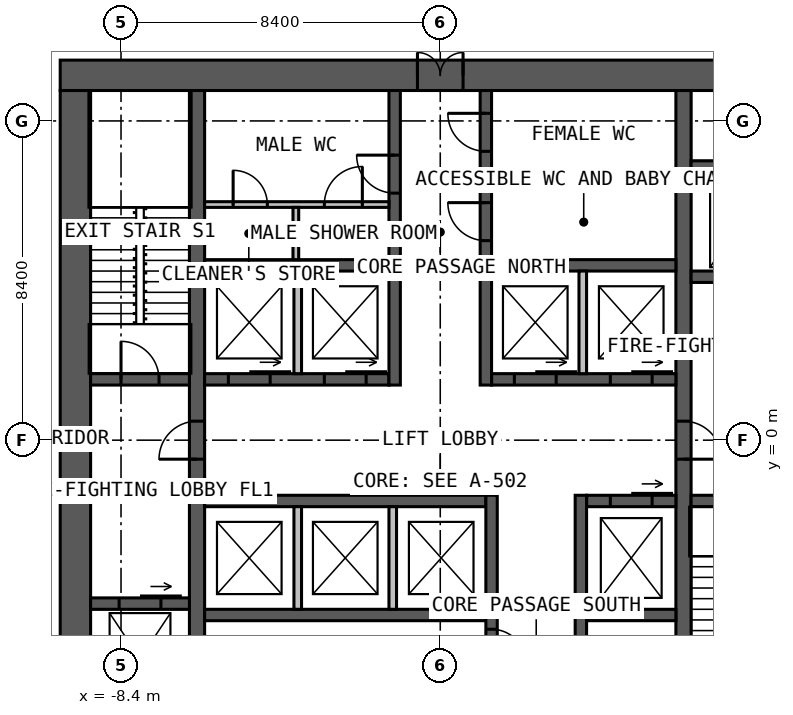
"""IFC4 building model, lengths in metres.
Left out: names, types, materials, properties, quantities, classifications, styles, units other than length and angle.
Written with IfcOpenShell. Run it as: python <this file> out.ifc"""

import sys

from ifc_helpers import new_model, si_unit, direction, frame, frame_2d, origin, place, context, subcontext, project, spatial, rectangle, extrude, element, fill, save


model = new_model("IFC4")
c1 = context("Model", 3, precision=1e-05, world=origin(), true_north=direction((0.0, 1.0)))
c2 = subcontext(c1, "Body", "Model", "MODEL_VIEW")
j1 = project(units=[si_unit("LENGTHUNIT", "METRE"), si_unit("PLANEANGLEUNIT", "RADIAN")], contexts=[c1])
p1 = place(None, origin())
s1 = spatial("IfcSite", under=j1, at=p1, CompositionType="ELEMENT")
p2 = place(p1, origin())
s2 = spatial("IfcBuilding", under=s1, at=p2, CompositionType="ELEMENT")
p3 = place(p2, frame((0.0, 0.0, 41.0)))
s3 = spatial("IfcBuildingStorey", under=s2, at=p3, CompositionType="ELEMENT", Elevation=41.0)
p4 = place(p3, frame((-10.0, 9.6, 0.0), z_axis=(0.0, 0.0, 1.0), x_axis=(1.0, 0.0, 0.0)))
e1 = element("IfcWall", 1, at=p4, inside=s3, PredefinedType="SOLIDWALL", context=c2, shape_type="SweptSolid", body=[
    extrude(rectangle(XDim=20.0, YDim=0.8, at=frame_2d((10.0, 0.0))), origin(), (0.0, 0.0, 1.0), 4.0),
])
p5 = place(p4, frame((9.4, 0.0, 0.0)))
e2 = element("IfcOpeningElement", 2, at=p5, cuts=e1, PredefinedType="OPENING", context=c2, shape_type="SweptSolid", body=[
    extrude(rectangle(XDim=1.2, YDim=2.2, at=frame_2d((0.6, 1.1))), frame((0.0, 0.41, 0.0), z_axis=(0.0, -1.0, 0.0), x_axis=(1.0, 0.0, 0.0)), (0.0, 0.0, 1.0), 0.82),
])
p6 = place(p3, frame((-9.6, 9.2, 0.0), z_axis=(0.0, 0.0, 1.0), x_axis=(0.0, -1.0, 0.0)))
e3 = element("IfcWall", 3, at=p6, inside=s3, PredefinedType="SOLIDWALL", context=c2, shape_type="SweptSolid", body=[
    extrude(rectangle(XDim=18.4, YDim=0.8, at=frame_2d((9.2, 0.0))), origin(), (0.0, 0.0, 1.0), 4.0),
])
p7 = place(p3, frame((-6.4, -9.2, 0.0), z_axis=(0.0, 0.0, 1.0), x_axis=(0.0, 1.0, 0.0)))
e4 = element("IfcWall", 4, at=p7, inside=s3, PredefinedType="SOLIDWALL", context=c2, shape_type="SweptSolid", body=[
    extrude(rectangle(XDim=18.4, YDim=0.4, at=frame_2d((9.2, 0.0))), origin(), (0.0, 0.0, 1.0), 4.0),
])
p8 = place(p7, frame((8.7, 0.0, 0.0)))
e5 = element("IfcOpeningElement", 5, at=p8, cuts=e4, PredefinedType="OPENING", context=c2, shape_type="SweptSolid", body=[
    extrude(rectangle(XDim=1.0, YDim=2.2, at=frame_2d((0.5, 1.1))), frame((0.0, 0.21, 0.0), z_axis=(0.0, -1.0, 0.0), x_axis=(1.0, 0.0, 0.0)), (0.0, 0.0, 1.0), 0.42),
])
p9 = place(p3, frame((6.4, 9.2, 0.0), z_axis=(0.0, 0.0, 1.0), x_axis=(0.0, -1.0, 0.0)))
e6 = element("IfcWall", 6, at=p9, inside=s3, PredefinedType="SOLIDWALL", context=c2, shape_type="SweptSolid", body=[
    extrude(rectangle(XDim=18.4, YDim=0.4, at=frame_2d((9.2, 0.0))), origin(), (0.0, 0.0, 1.0), 4.0),
])
p10 = place(p9, frame((8.7, 0.0, 0.0)))
e7 = element("IfcOpeningElement", 7, at=p10, cuts=e6, PredefinedType="OPENING", context=c2, shape_type="SweptSolid", body=[
    extrude(rectangle(XDim=1.0, YDim=2.2, at=frame_2d((0.5, 1.1))), frame((0.0, 0.21, 0.0), z_axis=(0.0, -1.0, 0.0), x_axis=(1.0, 0.0, 0.0)), (0.0, 0.0, 1.0), 0.42),
])
p11 = place(p3, frame((-6.2, 1.6, 0.0), z_axis=(0.0, 0.0, 1.0), x_axis=(1.0, 0.0, 0.0)))
e8 = element("IfcWall", 8, at=p11, inside=s3, PredefinedType="SOLIDWALL", context=c2, shape_type="SweptSolid", body=[
    extrude(rectangle(XDim=4.85, YDim=0.3, at=frame_2d((2.425, 0.0))), origin(), (0.0, 0.0, 1.0), 4.0),
])
p12 = place(p11, frame((0.625, 0.0, 0.0)))
e9 = element("IfcOpeningElement", 9, at=p12, cuts=e8, PredefinedType="OPENING", context=c2, shape_type="SweptSolid", body=[
    extrude(rectangle(XDim=1.1, YDim=2.2, at=frame_2d((0.55, 1.1))), frame((0.0, 0.16, 0.0), z_axis=(0.0, -1.0, 0.0), x_axis=(1.0, 0.0, 0.0)), (0.0, 0.0, 1.0), 0.32),
])
p13 = place(p11, frame((3.15, 0.0, 0.0)))
e10 = element("IfcOpeningElement", 10, at=p13, cuts=e8, PredefinedType="OPENING", context=c2, shape_type="SweptSolid", body=[
    extrude(rectangle(XDim=1.1, YDim=2.2, at=frame_2d((0.55, 1.1))), frame((0.0, 0.16, 0.0), z_axis=(0.0, -1.0, 0.0), x_axis=(1.0, 0.0, 0.0)), (0.0, 0.0, 1.0), 0.32),
])
p14 = place(p3, frame((1.35, 1.6, 0.0), z_axis=(0.0, 0.0, 1.0), x_axis=(1.0, 0.0, 0.0)))
e11 = element("IfcWall", 11, at=p14, inside=s3, PredefinedType="SOLIDWALL", context=c2, shape_type="SweptSolid", body=[
    extrude(rectangle(XDim=4.85, YDim=0.3, at=frame_2d((2.425, 0.0))), origin(), (0.0, 0.0, 1.0), 4.0),
])
p15 = place(p14, frame((0.6, 0.0, 0.0)))
e12 = element("IfcOpeningElement", 12, at=p15, cuts=e11, PredefinedType="OPENING", context=c2, shape_type="SweptSolid", body=[
    extrude(rectangle(XDim=1.1, YDim=2.2, at=frame_2d((0.55, 1.1))), frame((0.0, 0.16, 0.0), z_axis=(0.0, -1.0, 0.0), x_axis=(1.0, 0.0, 0.0)), (0.0, 0.0, 1.0), 0.32),
])
p16 = place(p14, frame((3.125, 0.0, 0.0)))
e13 = element("IfcOpeningElement", 13, at=p16, cuts=e11, PredefinedType="OPENING", context=c2, shape_type="SweptSolid", body=[
    extrude(rectangle(XDim=1.1, YDim=2.2, at=frame_2d((0.55, 1.1))), frame((0.0, 0.16, 0.0), z_axis=(0.0, -1.0, 0.0), x_axis=(1.0, 0.0, 0.0)), (0.0, 0.0, 1.0), 0.32),
])
for number, where, z_axis, x_axis in (
    (14, (-6.2, 4.6, 0.0), (0.0, 0.0, 1.0), (1.0, 0.0, 0.0)),
    (15, (1.35, 4.6, 0.0), (0.0, 0.0, 1.0), (1.0, 0.0, 0.0)),
):
    element("IfcWall", number, at=place(p3, frame(where, z_axis=z_axis, x_axis=x_axis)), inside=s3, PredefinedType="SOLIDWALL", context=c2, shape_type="SweptSolid", body=[
        extrude(rectangle(XDim=4.85, YDim=0.3, at=frame_2d((2.425, 0.0))), origin(), (0.0, 0.0, 1.0), 4.0),
    ])
p17 = place(p3, frame((-1.2, 1.45, 0.0), z_axis=(0.0, 0.0, 1.0), x_axis=(0.0, 1.0, 0.0)))
e16 = element("IfcWall", 16, at=p17, inside=s3, PredefinedType="SOLIDWALL", context=c2, shape_type="SweptSolid", body=[
    extrude(rectangle(XDim=7.75, YDim=0.3, at=frame_2d((3.875, 0.0))), origin(), (0.0, 0.0, 1.0), 4.0),
])
p18 = place(p17, frame((5.05, 0.0, 0.0)))
e17 = element("IfcOpeningElement", 17, at=p18, cuts=e16, PredefinedType="OPENING", context=c2, shape_type="SweptSolid", body=[
    extrude(rectangle(XDim=1.0, YDim=2.2, at=frame_2d((0.5, 1.1))), frame((0.0, 0.16, 0.0), z_axis=(0.0, -1.0, 0.0), x_axis=(1.0, 0.0, 0.0)), (0.0, 0.0, 1.0), 0.32),
])
p19 = place(p3, frame((1.2, 1.45, 0.0), z_axis=(0.0, 0.0, 1.0), x_axis=(0.0, 1.0, 0.0)))
e18 = element("IfcWall", 18, at=p19, inside=s3, PredefinedType="SOLIDWALL", context=c2, shape_type="SweptSolid", body=[
    extrude(rectangle(XDim=7.75, YDim=0.3, at=frame_2d((3.875, 0.0))), origin(), (0.0, 0.0, 1.0), 4.0),
])
p20 = place(p19, frame((3.8, 0.0, 0.0)))
e19 = element("IfcOpeningElement", 19, at=p20, cuts=e18, PredefinedType="OPENING", context=c2, shape_type="SweptSolid", body=[
    extrude(rectangle(XDim=1.0, YDim=2.2, at=frame_2d((0.5, 1.1))), frame((0.0, 0.16, 0.0), z_axis=(0.0, -1.0, 0.0), x_axis=(1.0, 0.0, 0.0)), (0.0, 0.0, 1.0), 0.32),
])
p21 = place(p19, frame((6.15, 0.0, 0.0)))
e20 = element("IfcOpeningElement", 20, at=p21, cuts=e18, PredefinedType="OPENING", context=c2, shape_type="SweptSolid", body=[
    extrude(rectangle(XDim=1.0, YDim=2.2, at=frame_2d((0.5, 1.1))), frame((0.0, 0.16, 0.0), z_axis=(0.0, -1.0, 0.0), x_axis=(1.0, 0.0, 0.0)), (0.0, 0.0, 1.0), 0.32),
])
p22 = place(p3, frame((-6.2, -1.6, 0.0), z_axis=(0.0, 0.0, 1.0), x_axis=(1.0, 0.0, 0.0)))
e21 = element("IfcWall", 21, at=p22, inside=s3, PredefinedType="SOLIDWALL", context=c2, shape_type="SweptSolid", body=[
    extrude(rectangle(XDim=7.4, YDim=0.3, at=frame_2d((3.7, 0.0))), origin(), (0.0, 0.0, 1.0), 4.0),
])
p23 = place(p3, frame((3.85, -1.6, 0.0), z_axis=(0.0, 0.0, 1.0), x_axis=(1.0, 0.0, 0.0)))
e22 = element("IfcWall", 22, at=p23, inside=s3, PredefinedType="SOLIDWALL", context=c2, shape_type="SweptSolid", body=[
    extrude(rectangle(XDim=2.35, YDim=0.3, at=frame_2d((1.175, 0.0))), origin(), (0.0, 0.0, 1.0), 4.0),
])
p24 = place(p23, frame((0.625, 0.0, 0.0)))
e23 = element("IfcOpeningElement", 23, at=p24, cuts=e22, PredefinedType="OPENING", context=c2, shape_type="SweptSolid", body=[
    extrude(rectangle(XDim=1.1, YDim=2.2, at=frame_2d((0.55, 1.1))), frame((0.0, 0.16, 0.0), z_axis=(0.0, -1.0, 0.0), x_axis=(1.0, 0.0, 0.0)), (0.0, 0.0, 1.0), 0.32),
])
p25 = place(p3, frame((-6.2, -4.6, 0.0), z_axis=(0.0, 0.0, 1.0), x_axis=(1.0, 0.0, 0.0)))
e24 = element("IfcWall", 24, at=p25, inside=s3, PredefinedType="SOLIDWALL", context=c2, shape_type="SweptSolid", body=[
    extrude(rectangle(XDim=7.4, YDim=0.3, at=frame_2d((3.7, 0.0))), origin(), (0.0, 0.0, 1.0), 4.0),
])
p26 = place(p3, frame((3.85, -4.6, 0.0), z_axis=(0.0, 0.0, 1.0), x_axis=(1.0, 0.0, 0.0)))
e25 = element("IfcWall", 25, at=p26, inside=s3, PredefinedType="SOLIDWALL", context=c2, shape_type="SweptSolid", body=[
    extrude(rectangle(XDim=2.35, YDim=0.3, at=frame_2d((1.175, 0.0))), origin(), (0.0, 0.0, 1.0), 4.0),
])
p27 = place(p3, frame((1.35, -1.45, 0.0), z_axis=(0.0, 0.0, 1.0), x_axis=(0.0, -1.0, 0.0)))
e26 = element("IfcWall", 26, at=p27, inside=s3, PredefinedType="SOLIDWALL", context=c2, shape_type="SweptSolid", body=[
    extrude(rectangle(XDim=7.75, YDim=0.3, at=frame_2d((3.875, 0.0))), origin(), (0.0, 0.0, 1.0), 4.0),
])
p28 = place(p27, frame((5.8, 0.0, 0.0)))
e27 = element("IfcOpeningElement", 27, at=p28, cuts=e26, PredefinedType="OPENING", context=c2, shape_type="SweptSolid", body=[
    extrude(rectangle(XDim=1.0, YDim=2.2, at=frame_2d((0.5, 1.1))), frame((0.0, 0.16, 0.0), z_axis=(0.0, -1.0, 0.0), x_axis=(1.0, 0.0, 0.0)), (0.0, 0.0, 1.0), 0.32),
])
p29 = place(p27, frame((3.525, 0.0, 0.0)))
e28 = element("IfcOpeningElement", 28, at=p29, cuts=e26, PredefinedType="OPENING", context=c2, shape_type="SweptSolid", body=[
    extrude(rectangle(XDim=0.9, YDim=2.2, at=frame_2d((0.45, 1.1))), frame((0.0, 0.16, 0.0), z_axis=(0.0, -1.0, 0.0), x_axis=(1.0, 0.0, 0.0)), (0.0, 0.0, 1.0), 0.32),
])
p30 = place(p3, frame((3.7, -1.45, 0.0), z_axis=(0.0, 0.0, 1.0), x_axis=(0.0, -1.0, 0.0)))
e29 = element("IfcWall", 29, at=p30, inside=s3, PredefinedType="SOLIDWALL", context=c2, shape_type="SweptSolid", body=[
    extrude(rectangle(XDim=7.75, YDim=0.3, at=frame_2d((3.875, 0.0))), origin(), (0.0, 0.0, 1.0), 4.0),
])
p31 = place(p30, frame((5.1, 0.0, 0.0)))
e30 = element("IfcOpeningElement", 30, at=p31, cuts=e29, PredefinedType="OPENING", context=c2, shape_type="SweptSolid", body=[
    extrude(rectangle(XDim=0.9, YDim=2.2, at=frame_2d((0.45, 1.1))), frame((0.0, 0.16, 0.0), z_axis=(0.0, -1.0, 0.0), x_axis=(1.0, 0.0, 0.0)), (0.0, 0.0, 1.0), 0.32),
])
p32 = place(p3, frame((-9.2, 1.6, 0.0), z_axis=(0.0, 0.0, 1.0), x_axis=(1.0, 0.0, 0.0)))
e31 = element("IfcWall", 31, at=p32, inside=s3, PredefinedType="SOLIDWALL", context=c2, shape_type="SweptSolid", body=[
    extrude(rectangle(XDim=2.6, YDim=0.3, at=frame_2d((1.3, 0.0))), origin(), (0.0, 0.0, 1.0), 4.0),
])
p33 = place(p32, frame((0.8, 0.0, 0.0)))
e32 = element("IfcOpeningElement", 32, at=p33, cuts=e31, PredefinedType="OPENING", context=c2, shape_type="SweptSolid", body=[
    extrude(rectangle(XDim=1.0, YDim=2.2, at=frame_2d((0.5, 1.1))), frame((0.0, 0.16, 0.0), z_axis=(0.0, -1.0, 0.0), x_axis=(1.0, 0.0, 0.0)), (0.0, 0.0, 1.0), 0.32),
])
p34 = place(p3, frame((6.6, -1.6, 0.0), z_axis=(0.0, 0.0, 1.0), x_axis=(1.0, 0.0, 0.0)))
e33 = element("IfcWall", 33, at=p34, inside=s3, PredefinedType="SOLIDWALL", context=c2, shape_type="SweptSolid", body=[
    extrude(rectangle(XDim=2.6, YDim=0.3, at=frame_2d((1.3, 0.0))), origin(), (0.0, 0.0, 1.0), 4.0),
])
p35 = place(p34, frame((0.8, 0.0, 0.0)))
e34 = element("IfcOpeningElement", 34, at=p35, cuts=e33, PredefinedType="OPENING", context=c2, shape_type="SweptSolid", body=[
    extrude(rectangle(XDim=1.0, YDim=2.2, at=frame_2d((0.5, 1.1))), frame((0.0, 0.16, 0.0), z_axis=(0.0, -1.0, 0.0), x_axis=(1.0, 0.0, 0.0)), (0.0, 0.0, 1.0), 0.32),
])
p36 = place(p3, frame((-9.2, -4.3, 0.0), z_axis=(0.0, 0.0, 1.0), x_axis=(1.0, 0.0, 0.0)))
e35 = element("IfcWall", 35, at=p36, inside=s3, PredefinedType="SOLIDWALL", context=c2, shape_type="SweptSolid", body=[
    extrude(rectangle(XDim=2.6, YDim=0.3, at=frame_2d((1.3, 0.0))), origin(), (0.0, 0.0, 1.0), 4.0),
])
p37 = place(p36, frame((0.75, 0.0, 0.0)))
e36 = element("IfcOpeningElement", 36, at=p37, cuts=e35, PredefinedType="OPENING", context=c2, shape_type="SweptSolid", body=[
    extrude(rectangle(XDim=1.1, YDim=2.2, at=frame_2d((0.55, 1.1))), frame((0.0, 0.16, 0.0), z_axis=(0.0, -1.0, 0.0), x_axis=(1.0, 0.0, 0.0)), (0.0, 0.0, 1.0), 0.32),
])
p38 = place(p3, frame((6.6, 4.3, 0.0), z_axis=(0.0, 0.0, 1.0), x_axis=(1.0, 0.0, 0.0)))
e37 = element("IfcWall", 37, at=p38, inside=s3, PredefinedType="SOLIDWALL", context=c2, shape_type="SweptSolid", body=[
    extrude(rectangle(XDim=2.6, YDim=0.3, at=frame_2d((1.3, 0.0))), origin(), (0.0, 0.0, 1.0), 4.0),
])
p39 = place(p38, frame((0.75, 0.0, 0.0)))
e38 = element("IfcOpeningElement", 38, at=p39, cuts=e37, PredefinedType="OPENING", context=c2, shape_type="SweptSolid", body=[
    extrude(rectangle(XDim=1.1, YDim=2.2, at=frame_2d((0.55, 1.1))), frame((0.0, 0.16, 0.0), z_axis=(0.0, -1.0, 0.0), x_axis=(1.0, 0.0, 0.0)), (0.0, 0.0, 1.0), 0.32),
])
p40 = place(p3, frame((6.6, 7.2, 0.0), z_axis=(0.0, 0.0, 1.0), x_axis=(1.0, 0.0, 0.0)))
e39 = element("IfcWall", 39, at=p40, inside=s3, PredefinedType="SOLIDWALL", context=c2, shape_type="SweptSolid", body=[
    extrude(rectangle(XDim=2.6, YDim=0.3, at=frame_2d((1.3, 0.0))), origin(), (0.0, 0.0, 1.0), 4.0),
])
for number, where, z_axis, x_axis in (
    (40, (-3.75, 1.75, 0.0), (0.0, 0.0, 1.0), (0.0, 1.0, 0.0)),
    (41, (3.75, 1.75, 0.0), (0.0, 0.0, 1.0), (0.0, 1.0, 0.0)),
    (42, (-3.75, -1.75, 0.0), (0.0, 0.0, 1.0), (0.0, -1.0, 0.0)),
    (43, (-1.25, -1.75, 0.0), (0.0, 0.0, 1.0), (0.0, -1.0, 0.0)),
):
    element("IfcWall", number, at=place(p3, frame(where, z_axis=z_axis, x_axis=x_axis)), inside=s3, PredefinedType="SOLIDWALL", context=c2, shape_type="SweptSolid", body=[
        extrude(rectangle(XDim=2.7, YDim=0.2, at=frame_2d((1.35, 0.0))), origin(), (0.0, 0.0, 1.0), 3.75),
    ])
p41 = place(p3, frame((1.35, 6.8, 0.0), z_axis=(0.0, 0.0, 1.0), x_axis=(1.0, 0.0, 0.0)))
e44 = element("IfcWall", 44, at=p41, inside=s3, PredefinedType="PARTITIONING", context=c2, shape_type="SweptSolid", body=[
    extrude(rectangle(XDim=4.85, YDim=0.15, at=frame_2d((2.425, 0.0))), origin(), (0.0, 0.0, 1.0), 3.75),
])
p42 = place(p3, frame((-6.2, 6.2, 0.0), z_axis=(0.0, 0.0, 1.0), x_axis=(1.0, 0.0, 0.0)))
e45 = element("IfcWall", 45, at=p42, inside=s3, PredefinedType="PARTITIONING", context=c2, shape_type="SweptSolid", body=[
    extrude(rectangle(XDim=4.85, YDim=0.15, at=frame_2d((2.425, 0.0))), origin(), (0.0, 0.0, 1.0), 3.75),
])
p43 = place(p42, frame((3.15, 0.0, 0.0)))
e46 = element("IfcOpeningElement", 46, at=p43, cuts=e45, PredefinedType="OPENING", context=c2, shape_type="SweptSolid", body=[
    extrude(rectangle(XDim=1.0, YDim=2.2, at=frame_2d((0.5, 1.1))), frame((0.0, 0.085, 0.0), z_axis=(0.0, -1.0, 0.0), x_axis=(1.0, 0.0, 0.0)), (0.0, 0.0, 1.0), 0.17),
])
p44 = place(p42, frame((0.75, 0.0, 0.0)))
e47 = element("IfcOpeningElement", 47, at=p44, cuts=e45, PredefinedType="OPENING", context=c2, shape_type="SweptSolid", body=[
    extrude(rectangle(XDim=0.9, YDim=2.2, at=frame_2d((0.45, 1.1))), frame((0.0, 0.085, 0.0), z_axis=(0.0, -1.0, 0.0), x_axis=(1.0, 0.0, 0.0)), (0.0, 0.0, 1.0), 0.17),
])
p45 = place(p3, frame((-3.8, 4.75, 0.0), z_axis=(0.0, 0.0, 1.0), x_axis=(0.0, 1.0, 0.0)))
e48 = element("IfcWall", 48, at=p45, inside=s3, PredefinedType="PARTITIONING", context=c2, shape_type="SweptSolid", body=[
    extrude(rectangle(XDim=1.375, YDim=0.15, at=frame_2d((0.688, 0.0))), origin(), (0.0, 0.0, 1.0), 3.75),
])
p46 = place(p5, origin())
e49 = element("IfcDoor", 49, at=p46, inside=s3, OperationType="DOUBLE_DOOR_SINGLE_SWING", PredefinedType="DOOR", context=c2, shape_type="SweptSolid", body=[
    extrude(rectangle(XDim=1.2, YDim=2.2, at=frame_2d((0.6, 1.1))), frame((0.0, 0.025, 0.0), z_axis=(0.0, -1.0, 0.0), x_axis=(1.0, 0.0, 0.0)), (0.0, 0.0, 1.0), 0.05),
])
fill(e2, e49)
p47 = place(p8, origin())
e50 = element("IfcDoor", 50, at=p47, inside=s3, OperationType="SINGLE_SWING_LEFT", PredefinedType="DOOR", context=c2, shape_type="SweptSolid", body=[
    extrude(rectangle(XDim=1.0, YDim=2.2, at=frame_2d((0.5, 1.1))), frame((0.0, 0.025, 0.0), z_axis=(0.0, -1.0, 0.0), x_axis=(1.0, 0.0, 0.0)), (0.0, 0.0, 1.0), 0.05),
])
fill(e5, e50)
p48 = place(p10, origin())
e51 = element("IfcDoor", 51, at=p48, inside=s3, OperationType="SINGLE_SWING_RIGHT", PredefinedType="DOOR", context=c2, shape_type="SweptSolid", body=[
    extrude(rectangle(XDim=1.0, YDim=2.2, at=frame_2d((0.5, 1.1))), frame((0.0, 0.025, 0.0), z_axis=(0.0, -1.0, 0.0), x_axis=(1.0, 0.0, 0.0)), (0.0, 0.0, 1.0), 0.05),
])
fill(e7, e51)
p49 = place(p33, origin())
e52 = element("IfcDoor", 52, at=p49, inside=s3, OperationType="SINGLE_SWING_LEFT", PredefinedType="DOOR", context=c2, shape_type="SweptSolid", body=[
    extrude(rectangle(XDim=1.0, YDim=2.2, at=frame_2d((0.5, 1.1))), frame((0.0, 0.025, 0.0), z_axis=(0.0, -1.0, 0.0), x_axis=(1.0, 0.0, 0.0)), (0.0, 0.0, 1.0), 0.05),
])
fill(e32, e52)
p50 = place(p18, origin())
e53 = element("IfcDoor", 53, at=p50, inside=s3, OperationType="SINGLE_SWING_RIGHT", PredefinedType="DOOR", context=c2, shape_type="SweptSolid", body=[
    extrude(rectangle(XDim=1.0, YDim=2.2, at=frame_2d((0.5, 1.1))), frame((0.0, 0.025, 0.0), z_axis=(0.0, -1.0, 0.0), x_axis=(1.0, 0.0, 0.0)), (0.0, 0.0, 1.0), 0.05),
])
fill(e17, e53)
p51 = place(p20, origin())
e54 = element("IfcDoor", 54, at=p51, inside=s3, OperationType="SINGLE_SWING_RIGHT", PredefinedType="DOOR", context=c2, shape_type="SweptSolid", body=[
    extrude(rectangle(XDim=1.0, YDim=2.2, at=frame_2d((0.5, 1.1))), frame((0.0, 0.025, 0.0), z_axis=(0.0, -1.0, 0.0), x_axis=(1.0, 0.0, 0.0)), (0.0, 0.0, 1.0), 0.05),
])
fill(e19, e54)
p52 = place(p21, origin())
e55 = element("IfcDoor", 55, at=p52, inside=s3, OperationType="SINGLE_SWING_RIGHT", PredefinedType="DOOR", context=c2, shape_type="SweptSolid", body=[
    extrude(rectangle(XDim=1.0, YDim=2.2, at=frame_2d((0.5, 1.1))), frame((0.0, 0.025, 0.0), z_axis=(0.0, -1.0, 0.0), x_axis=(1.0, 0.0, 0.0)), (0.0, 0.0, 1.0), 0.05),
])
fill(e20, e55)
p53 = place(p29, origin())
e56 = element("IfcDoor", 56, at=p53, inside=s3, OperationType="SINGLE_SWING_RIGHT", PredefinedType="DOOR", context=c2, shape_type="SweptSolid", body=[
    extrude(rectangle(XDim=0.9, YDim=2.2, at=frame_2d((0.45, 1.1))), frame((0.0, 0.025, 0.0), z_axis=(0.0, -1.0, 0.0), x_axis=(1.0, 0.0, 0.0)), (0.0, 0.0, 1.0), 0.05),
])
fill(e28, e56)
p54 = place(p43, origin())
e57 = element("IfcDoor", 57, at=p54, inside=s3, OperationType="SINGLE_SWING_RIGHT", PredefinedType="DOOR", context=c2, shape_type="SweptSolid", body=[
    extrude(rectangle(XDim=1.0, YDim=2.2, at=frame_2d((0.5, 1.1))), frame((0.0, 0.025, 0.0), z_axis=(0.0, -1.0, 0.0), x_axis=(1.0, 0.0, 0.0)), (0.0, 0.0, 1.0), 0.05),
])
fill(e46, e57)
p55 = place(p44, origin())
e58 = element("IfcDoor", 58, at=p55, inside=s3, OperationType="SINGLE_SWING_LEFT", PredefinedType="DOOR", context=c2, shape_type="SweptSolid", body=[
    extrude(rectangle(XDim=0.9, YDim=2.2, at=frame_2d((0.45, 1.1))), frame((0.0, 0.025, 0.0), z_axis=(0.0, -1.0, 0.0), x_axis=(1.0, 0.0, 0.0)), (0.0, 0.0, 1.0), 0.05),
])
fill(e47, e58)
p56 = place(p12, origin())
e59 = element("IfcDoor", 59, at=p56, inside=s3, OperationType="SLIDING_TO_LEFT", PredefinedType="DOOR", context=c2, shape_type="SweptSolid", body=[
    extrude(rectangle(XDim=1.1, YDim=2.2, at=frame_2d((0.55, 1.1))), frame((0.0, 0.025, 0.0), z_axis=(0.0, -1.0, 0.0), x_axis=(1.0, 0.0, 0.0)), (0.0, 0.0, 1.0), 0.05),
])
fill(e9, e59)
p57 = place(p13, origin())
e60 = element("IfcDoor", 60, at=p57, inside=s3, OperationType="SLIDING_TO_LEFT", PredefinedType="DOOR", context=c2, shape_type="SweptSolid", body=[
    extrude(rectangle(XDim=1.1, YDim=2.2, at=frame_2d((0.55, 1.1))), frame((0.0, 0.025, 0.0), z_axis=(0.0, -1.0, 0.0), x_axis=(1.0, 0.0, 0.0)), (0.0, 0.0, 1.0), 0.05),
])
fill(e10, e60)
p58 = place(p15, origin())
e61 = element("IfcDoor", 61, at=p58, inside=s3, OperationType="SLIDING_TO_LEFT", PredefinedType="DOOR", context=c2, shape_type="SweptSolid", body=[
    extrude(rectangle(XDim=1.1, YDim=2.2, at=frame_2d((0.55, 1.1))), frame((0.0, 0.025, 0.0), z_axis=(0.0, -1.0, 0.0), x_axis=(1.0, 0.0, 0.0)), (0.0, 0.0, 1.0), 0.05),
])
fill(e12, e61)
p59 = place(p16, origin())
e62 = element("IfcDoor", 62, at=p59, inside=s3, OperationType="SLIDING_TO_LEFT", PredefinedType="DOOR", context=c2, shape_type="SweptSolid", body=[
    extrude(rectangle(XDim=1.1, YDim=2.2, at=frame_2d((0.55, 1.1))), frame((0.0, 0.025, 0.0), z_axis=(0.0, -1.0, 0.0), x_axis=(1.0, 0.0, 0.0)), (0.0, 0.0, 1.0), 0.05),
])
fill(e13, e62)
p60 = place(p24, origin())
e63 = element("IfcDoor", 63, at=p60, inside=s3, OperationType="SLIDING_TO_LEFT", PredefinedType="DOOR", context=c2, shape_type="SweptSolid", body=[
    extrude(rectangle(XDim=1.1, YDim=2.2, at=frame_2d((0.55, 1.1))), frame((0.0, 0.025, 0.0), z_axis=(0.0, -1.0, 0.0), x_axis=(1.0, 0.0, 0.0)), (0.0, 0.0, 1.0), 0.05),
])
fill(e23, e63)
p61 = place(p37, origin())
e64 = element("IfcDoor", 64, at=p61, inside=s3, OperationType="SLIDING_TO_LEFT", PredefinedType="DOOR", context=c2, shape_type="SweptSolid", body=[
    extrude(rectangle(XDim=1.1, YDim=2.2, at=frame_2d((0.55, 1.1))), frame((0.0, 0.025, 0.0), z_axis=(0.0, -1.0, 0.0), x_axis=(1.0, 0.0, 0.0)), (0.0, 0.0, 1.0), 0.05),
])
fill(e36, e64)
save(model, sys.argv[1])
